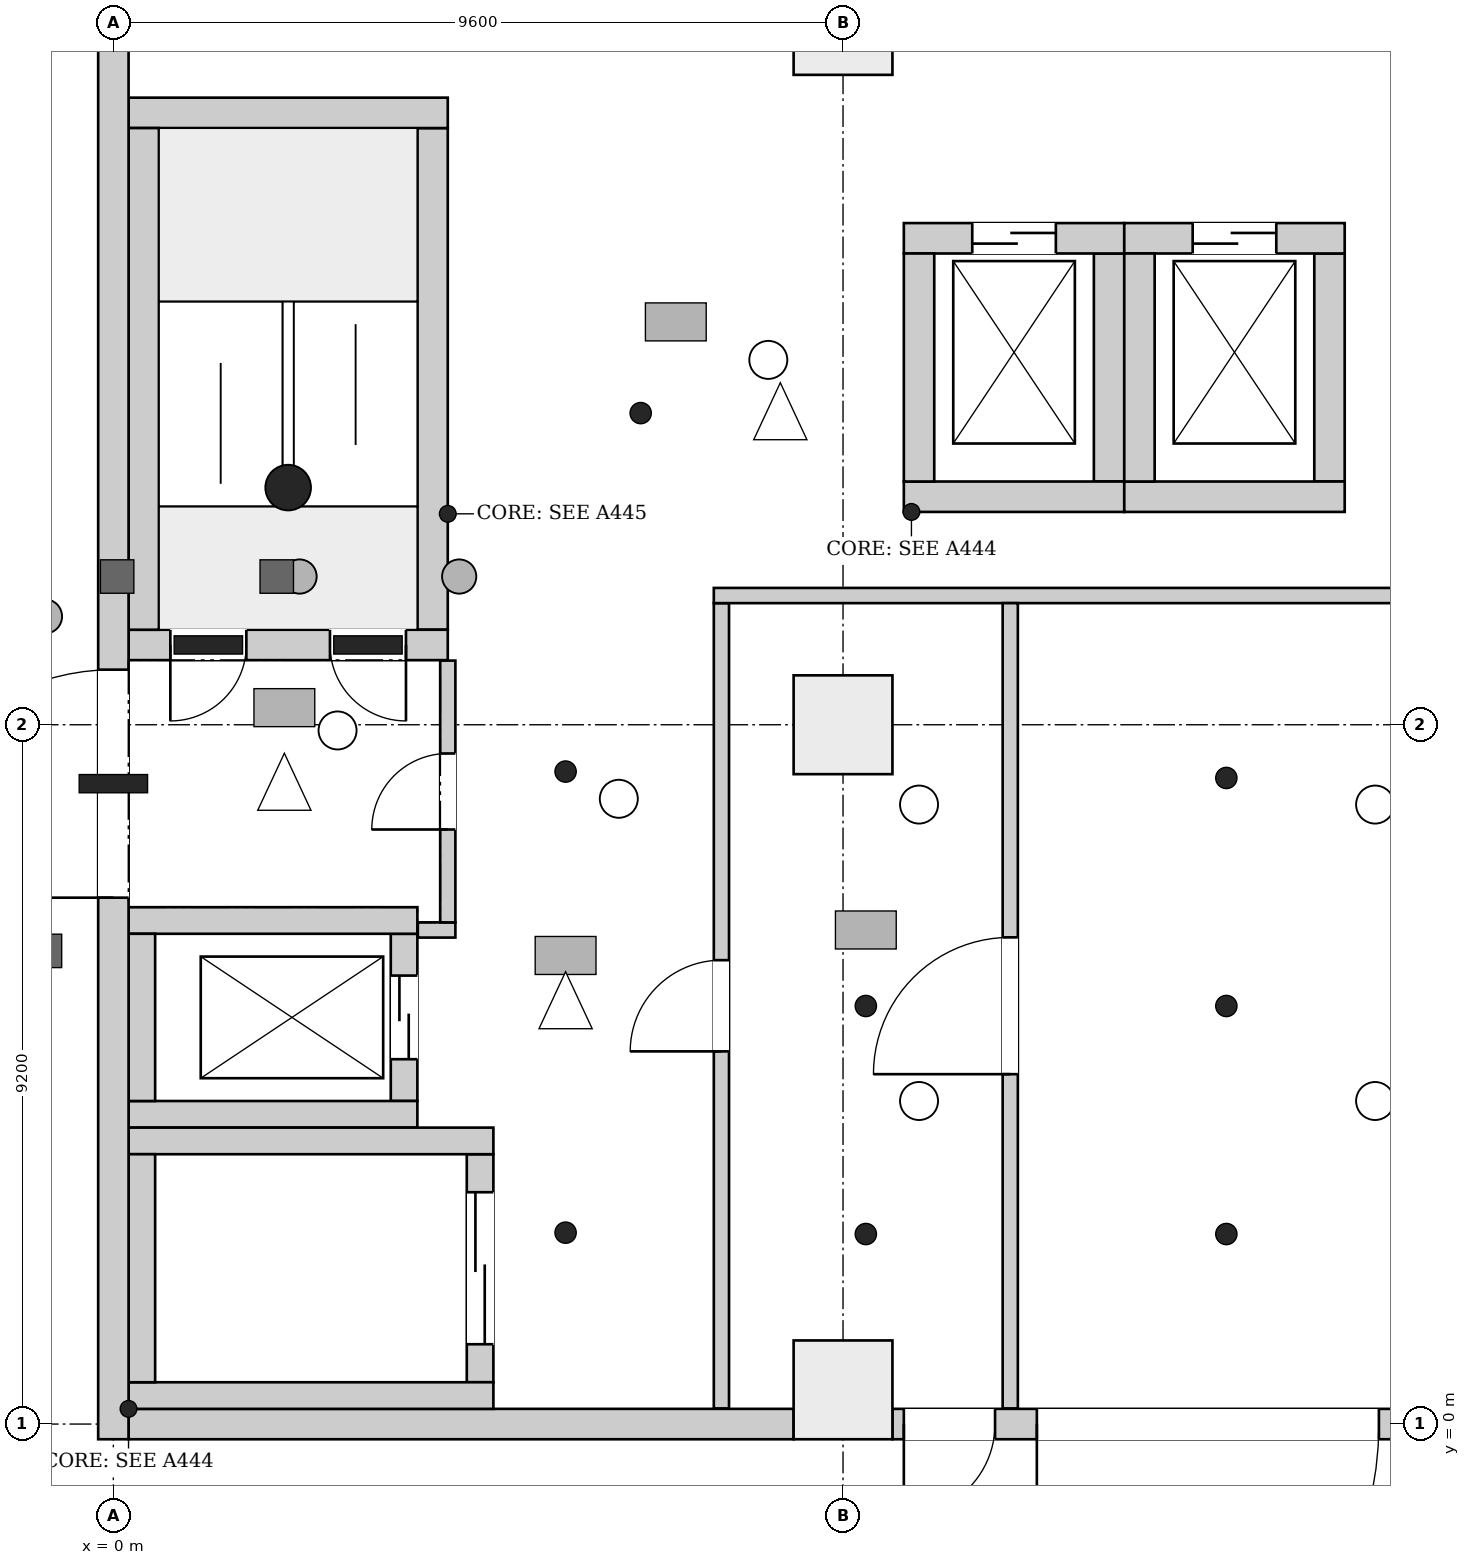
"""IFC4 building model, lengths in metres.
Left out: names, types, materials, properties, quantities, classifications, styles, units other than length and angle.
Written with IfcOpenShell. Run it as: python <this file> out.ifc"""

import sys

from ifc_helpers import new_model, si_unit, direction, frame, frame_2d, origin, origin_2d, place, context, subcontext, project, spatial, rectangle, extrude, element, fill, save


model = new_model("IFC4")
c1 = context("Model", 3, precision=1e-05, world=origin(), true_north=direction((0.0, 1.0)))
c2 = subcontext(c1, "Body", "Model", "MODEL_VIEW")
j1 = project(units=[si_unit("LENGTHUNIT", "METRE"), si_unit("PLANEANGLEUNIT", "RADIAN")], contexts=[c1])
p1 = place(None, origin())
s1 = spatial("IfcSite", under=j1, at=p1, CompositionType="ELEMENT")
p2 = place(p1, origin())
s2 = spatial("IfcBuilding", under=s1, at=p2, CompositionType="ELEMENT")
p3 = place(p2, origin())
s3 = spatial("IfcBuildingStorey", under=s2, at=p3, CompositionType="ELEMENT", Elevation=0.0)
p4 = place(p3, frame((0.0, -0.2, 0.0), z_axis=(0.0, 0.0, 1.0), x_axis=(0.0, 1.0, 0.0)))
e1 = element("IfcWall", 1, at=p4, inside=s3, PredefinedType="SHEAR", context=c2, shape_type="SweptSolid", body=[
    extrude(rectangle(XDim=46.88, YDim=0.4, at=frame_2d((23.44, 0.0))), origin(), (0.0, 0.0, 1.0), 6.5),
])
p5 = place(p4, frame((7.125, 0.0, 0.0)))
e2 = element("IfcOpeningElement", 2, at=p5, cuts=e1, PredefinedType="OPENING", context=c2, shape_type="SweptSolid", body=[
    extrude(rectangle(XDim=3.0, YDim=2.4, at=frame_2d((1.5, 1.2))), frame((0.0, 0.21, 0.0), z_axis=(0.0, -1.0, 0.0), x_axis=(1.0, 0.0, 0.0)), (0.0, 0.0, 1.0), 0.42),
])
p6 = place(p4, frame((38.2, 0.0, 0.0)))
e3 = element("IfcOpeningElement", 3, at=p6, cuts=e1, PredefinedType="OPENING", context=c2, shape_type="SweptSolid", body=[
    extrude(rectangle(XDim=3.0, YDim=2.4, at=frame_2d((1.5, 1.2))), frame((0.0, 0.21, 0.0), z_axis=(0.0, -1.0, 0.0), x_axis=(1.0, 0.0, 0.0)), (0.0, 0.0, 1.0), 0.42),
])
p7 = place(p3, frame((0.2, 10.25, 0.0), z_axis=(0.0, 0.0, 1.0), x_axis=(1.0, 0.0, 0.0)))
e4 = element("IfcWall", 4, at=p7, inside=s3, PredefinedType="SHEAR", context=c2, shape_type="SweptSolid", body=[
    extrude(rectangle(XDim=4.2, YDim=0.4, at=frame_2d((2.1, 0.0))), origin(), (0.0, 0.0, 1.0), 6.5),
])
p8 = place(p7, frame((0.55, 0.0, 0.0)))
e5 = element("IfcOpeningElement", 5, at=p8, cuts=e4, PredefinedType="OPENING", context=c2, shape_type="SweptSolid", body=[
    extrude(rectangle(XDim=1.0, YDim=2.1, at=frame_2d((0.5, 1.05))), frame((0.0, 0.21, 0.0), z_axis=(0.0, -1.0, 0.0), x_axis=(1.0, 0.0, 0.0)), (0.0, 0.0, 1.0), 0.42),
])
p9 = place(p7, frame((2.65, 0.0, 0.0)))
e6 = element("IfcOpeningElement", 6, at=p9, cuts=e4, PredefinedType="OPENING", context=c2, shape_type="SweptSolid", body=[
    extrude(rectangle(XDim=1.0, YDim=2.1, at=frame_2d((0.5, 1.05))), frame((0.0, 0.21, 0.0), z_axis=(0.0, -1.0, 0.0), x_axis=(1.0, 0.0, 0.0)), (0.0, 0.0, 1.0), 0.42),
])
p10 = place(p3, frame((0.2, 17.25, 0.0), z_axis=(0.0, 0.0, 1.0), x_axis=(1.0, 0.0, 0.0)))
e7 = element("IfcWall", 7, at=p10, inside=s3, PredefinedType="SHEAR", context=c2, shape_type="SweptSolid", body=[
    extrude(rectangle(XDim=4.2, YDim=0.4, at=frame_2d((2.1, 0.0))), origin(), (0.0, 0.0, 1.0), 6.5),
])
for number, where, z_axis, x_axis in (
    (8, (0.4, 10.45, 0.0), (0.0, 0.0, 1.0), (0.0, 1.0, 0.0)),
    (9, (4.2, 10.45, 0.0), (0.0, 0.0, 1.0), (0.0, 1.0, 0.0)),
):
    element("IfcWall", number, at=place(p3, frame(where, z_axis=z_axis, x_axis=x_axis)), inside=s3, PredefinedType="SHEAR", context=c2, shape_type="SweptSolid", body=[
        extrude(rectangle(XDim=6.6, YDim=0.4, at=frame_2d((3.3, 0.0))), origin(), (0.0, 0.0, 1.0), 6.5),
    ])
for number, where, z_axis, x_axis in (
    (10, (0.2, 0.375, 0.0), (0.0, 0.0, 1.0), (1.0, 0.0, 0.0)),
    (11, (0.2, 3.725, 0.0), (0.0, 0.0, 1.0), (1.0, 0.0, 0.0)),
):
    element("IfcWall", number, at=place(p3, frame(where, z_axis=z_axis, x_axis=x_axis)), inside=s3, PredefinedType="SHEAR", context=c2, shape_type="SweptSolid", body=[
        extrude(rectangle(XDim=4.8, YDim=0.35, at=frame_2d((2.4, 0.0))), origin(), (0.0, 0.0, 1.0), 6.5),
    ])
p11 = place(p3, frame((0.375, 0.55, 0.0), z_axis=(0.0, 0.0, 1.0), x_axis=(0.0, 1.0, 0.0)))
e12 = element("IfcWall", 12, at=p11, inside=s3, PredefinedType="SHEAR", context=c2, shape_type="SweptSolid", body=[
    extrude(rectangle(XDim=3.0, YDim=0.35, at=frame_2d((1.5, 0.0))), origin(), (0.0, 0.0, 1.0), 6.5),
])
p12 = place(p3, frame((4.825, 0.55, 0.0), z_axis=(0.0, 0.0, 1.0), x_axis=(0.0, 1.0, 0.0)))
e13 = element("IfcWall", 13, at=p12, inside=s3, PredefinedType="SHEAR", context=c2, shape_type="SweptSolid", body=[
    extrude(rectangle(XDim=3.0, YDim=0.35, at=frame_2d((1.5, 0.0))), origin(), (0.0, 0.0, 1.0), 6.5),
])
p13 = place(p12, frame((0.5, 0.0, 0.0)))
e14 = element("IfcOpeningElement", 14, at=p13, cuts=e13, PredefinedType="OPENING", context=c2, shape_type="SweptSolid", body=[
    extrude(rectangle(XDim=2.0, YDim=2.4, at=frame_2d((1.0, 1.2))), frame((0.0, 0.185, 0.0), z_axis=(0.0, -1.0, 0.0), x_axis=(1.0, 0.0, 0.0)), (0.0, 0.0, 1.0), 0.37),
])
for number, where, z_axis, x_axis in (
    (15, (0.2, 4.075, 0.0), (0.0, 0.0, 1.0), (1.0, 0.0, 0.0)),
    (16, (0.2, 6.625, 0.0), (0.0, 0.0, 1.0), (1.0, 0.0, 0.0)),
):
    element("IfcWall", number, at=place(p3, frame(where, z_axis=z_axis, x_axis=x_axis)), inside=s3, PredefinedType="SHEAR", context=c2, shape_type="SweptSolid", body=[
        extrude(rectangle(XDim=3.8, YDim=0.35, at=frame_2d((1.9, 0.0))), origin(), (0.0, 0.0, 1.0), 6.5),
    ])
p14 = place(p3, frame((0.375, 4.25, 0.0), z_axis=(0.0, 0.0, 1.0), x_axis=(0.0, 1.0, 0.0)))
e17 = element("IfcWall", 17, at=p14, inside=s3, PredefinedType="SHEAR", context=c2, shape_type="SweptSolid", body=[
    extrude(rectangle(XDim=2.2, YDim=0.35, at=frame_2d((1.1, 0.0))), origin(), (0.0, 0.0, 1.0), 6.5),
])
p15 = place(p3, frame((3.825, 4.25, 0.0), z_axis=(0.0, 0.0, 1.0), x_axis=(0.0, 1.0, 0.0)))
e18 = element("IfcWall", 18, at=p15, inside=s3, PredefinedType="SHEAR", context=c2, shape_type="SweptSolid", body=[
    extrude(rectangle(XDim=2.2, YDim=0.35, at=frame_2d((1.1, 0.0))), origin(), (0.0, 0.0, 1.0), 6.5),
])
p16 = place(p15, frame((0.55, 0.0, 0.0)))
e19 = element("IfcOpeningElement", 19, at=p16, cuts=e18, PredefinedType="OPENING", context=c2, shape_type="SweptSolid", body=[
    extrude(rectangle(XDim=1.1, YDim=2.1, at=frame_2d((0.55, 1.05))), frame((0.0, 0.185, 0.0), z_axis=(0.0, -1.0, 0.0), x_axis=(1.0, 0.0, 0.0)), (0.0, 0.0, 1.0), 0.37),
])
p17 = place(p3, frame((10.4, 12.2, 0.0), z_axis=(0.0, 0.0, 1.0), x_axis=(1.0, 0.0, 0.0)))
e20 = element("IfcWall", 20, at=p17, inside=s3, PredefinedType="SHEAR", context=c2, shape_type="SweptSolid", body=[
    extrude(rectangle(XDim=2.9, YDim=0.4, at=frame_2d((1.45, 0.0))), origin(), (0.0, 0.0, 1.0), 6.5),
])
p18 = place(p3, frame((10.4, 15.6, 0.0), z_axis=(0.0, 0.0, 1.0), x_axis=(1.0, 0.0, 0.0)))
e21 = element("IfcWall", 21, at=p18, inside=s3, PredefinedType="SHEAR", context=c2, shape_type="SweptSolid", body=[
    extrude(rectangle(XDim=2.9, YDim=0.4, at=frame_2d((1.45, 0.0))), origin(), (0.0, 0.0, 1.0), 6.5),
])
p19 = place(p18, frame((0.9, 0.0, 0.0)))
e22 = element("IfcOpeningElement", 22, at=p19, cuts=e21, PredefinedType="OPENING", context=c2, shape_type="SweptSolid", body=[
    extrude(rectangle(XDim=1.1, YDim=2.1, at=frame_2d((0.55, 1.05))), frame((0.0, 0.21, 0.0), z_axis=(0.0, -1.0, 0.0), x_axis=(1.0, 0.0, 0.0)), (0.0, 0.0, 1.0), 0.42),
])
for number, where, z_axis, x_axis in (
    (23, (10.6, 12.4, 0.0), (0.0, 0.0, 1.0), (0.0, 1.0, 0.0)),
    (24, (13.1, 12.4, 0.0), (0.0, 0.0, 1.0), (0.0, 1.0, 0.0)),
):
    element("IfcWall", number, at=place(p3, frame(where, z_axis=z_axis, x_axis=x_axis)), inside=s3, PredefinedType="SHEAR", context=c2, shape_type="SweptSolid", body=[
        extrude(rectangle(XDim=3.0, YDim=0.4, at=frame_2d((1.5, 0.0))), origin(), (0.0, 0.0, 1.0), 6.5),
    ])
p20 = place(p3, frame((13.3, 12.2, 0.0), z_axis=(0.0, 0.0, 1.0), x_axis=(1.0, 0.0, 0.0)))
e25 = element("IfcWall", 25, at=p20, inside=s3, PredefinedType="SHEAR", context=c2, shape_type="SweptSolid", body=[
    extrude(rectangle(XDim=2.9, YDim=0.4, at=frame_2d((1.45, 0.0))), origin(), (0.0, 0.0, 1.0), 6.5),
])
p21 = place(p3, frame((13.3, 15.6, 0.0), z_axis=(0.0, 0.0, 1.0), x_axis=(1.0, 0.0, 0.0)))
e26 = element("IfcWall", 26, at=p21, inside=s3, PredefinedType="SHEAR", context=c2, shape_type="SweptSolid", body=[
    extrude(rectangle(XDim=2.9, YDim=0.4, at=frame_2d((1.45, 0.0))), origin(), (0.0, 0.0, 1.0), 6.5),
])
p22 = place(p21, frame((0.9, 0.0, 0.0)))
e27 = element("IfcOpeningElement", 27, at=p22, cuts=e26, PredefinedType="OPENING", context=c2, shape_type="SweptSolid", body=[
    extrude(rectangle(XDim=1.1, YDim=2.1, at=frame_2d((0.55, 1.05))), frame((0.0, 0.21, 0.0), z_axis=(0.0, -1.0, 0.0), x_axis=(1.0, 0.0, 0.0)), (0.0, 0.0, 1.0), 0.42),
])
for number, where, z_axis, x_axis in (
    (28, (13.5, 12.4, 0.0), (0.0, 0.0, 1.0), (0.0, 1.0, 0.0)),
    (29, (16.0, 12.4, 0.0), (0.0, 0.0, 1.0), (0.0, 1.0, 0.0)),
):
    element("IfcWall", number, at=place(p3, frame(where, z_axis=z_axis, x_axis=x_axis)), inside=s3, PredefinedType="SHEAR", context=c2, shape_type="SweptSolid", body=[
        extrude(rectangle(XDim=3.0, YDim=0.4, at=frame_2d((1.5, 0.0))), origin(), (0.0, 0.0, 1.0), 6.5),
    ])
for number, where, z_axis, x_axis in (
    (30, (9.6, 0.45, 0.0), (0.0, 0.0, 1.0), (1.0, 0.0, 0.0)),
    (31, (9.6, 9.2, 0.0), (0.0, 0.0, 1.0), (1.0, 0.0, 0.0)),
    (32, (9.6, 18.4, 0.0), (0.0, 0.0, 1.0), (1.0, 0.0, 0.0)),
):
    element("IfcColumn", number, at=place(p3, frame(where, z_axis=z_axis, x_axis=x_axis)), inside=s3, PredefinedType="COLUMN", context=c2, shape_type="SweptSolid", body=[
        extrude(rectangle(XDim=1.3, YDim=1.3, at=origin_2d()), origin(), (0.0, 0.0, 1.0), 6.5),
    ])
p23 = place(p3, frame((0.2, 0.0, 0.0), z_axis=(0.0, 0.0, 1.0), x_axis=(1.0, 0.0, 0.0)))
e33 = element("IfcWall", 33, at=p23, inside=s3, PredefinedType="ELEMENTEDWALL", context=c2, shape_type="SweptSolid", body=[
    extrude(rectangle(XDim=8.75, YDim=0.4, at=frame_2d((4.375, 0.0))), origin(), (0.0, 0.0, 1.0), 6.15),
])
p24 = place(p3, frame((10.25, 0.0, 0.0), z_axis=(0.0, 0.0, 1.0), x_axis=(1.0, 0.0, 0.0)))
e34 = element("IfcWall", 34, at=p24, inside=s3, PredefinedType="ELEMENTEDWALL", context=c2, shape_type="SweptSolid", body=[
    extrude(rectangle(XDim=8.3, YDim=0.4, at=frame_2d((4.15, 0.0))), origin(), (0.0, 0.0, 1.0), 6.15),
])
p25 = place(p24, frame((0.15, 0.0, 0.0)))
e35 = element("IfcOpeningElement", 35, at=p25, cuts=e34, PredefinedType="OPENING", context=c2, shape_type="SweptSolid", body=[
    extrude(rectangle(XDim=1.2, YDim=2.4, at=frame_2d((0.6, 1.2))), frame((0.0, 0.21, 0.0), z_axis=(0.0, -1.0, 0.0), x_axis=(1.0, 0.0, 0.0)), (0.0, 0.0, 1.0), 0.42),
])
p26 = place(p24, frame((1.9, 0.0, 0.0)))
e36 = element("IfcOpeningElement", 36, at=p26, cuts=e34, PredefinedType="OPENING", context=c2, shape_type="SweptSolid", body=[
    extrude(rectangle(XDim=4.5, YDim=4.5, at=frame_2d((2.25, 2.25))), frame((0.0, 0.21, 0.0), z_axis=(0.0, -1.0, 0.0), x_axis=(1.0, 0.0, 0.0)), (0.0, 0.0, 1.0), 0.42),
])
p27 = place(p24, frame((6.9, 0.0, 0.0)))
e37 = element("IfcOpeningElement", 37, at=p27, cuts=e34, PredefinedType="OPENING", context=c2, shape_type="SweptSolid", body=[
    extrude(rectangle(XDim=0.9, YDim=2.1, at=frame_2d((0.45, 1.05))), frame((0.0, 0.21, 0.0), z_axis=(0.0, -1.0, 0.0), x_axis=(1.0, 0.0, 0.0)), (0.0, 0.0, 1.0), 0.42),
])
p28 = place(p3, frame((4.006, 6.5, 0.0), z_axis=(0.0, 0.0, 1.0), x_axis=(1.0, 0.0, 0.0)))
e38 = element("IfcWall", 38, at=p28, inside=s3, PredefinedType="PARTITIONING", context=c2, shape_type="SweptSolid", body=[
    extrude(rectangle(XDim=0.494, YDim=0.2, at=frame_2d((0.247, 0.0))), origin(), (0.0, 0.0, 1.0), 6.15),
])
p29 = place(p3, frame((4.4, 6.6, 0.0), z_axis=(0.0, 0.0, 1.0), x_axis=(0.0, 1.0, 0.0)))
e39 = element("IfcWall", 39, at=p29, inside=s3, PredefinedType="PARTITIONING", context=c2, shape_type="SweptSolid", body=[
    extrude(rectangle(XDim=3.444, YDim=0.2, at=frame_2d((1.722, 0.0))), origin(), (0.0, 0.0, 1.0), 6.15),
])
p30 = place(p29, frame((1.222, 0.0, 0.0)))
e40 = element("IfcOpeningElement", 40, at=p30, cuts=e39, PredefinedType="OPENING", context=c2, shape_type="SweptSolid", body=[
    extrude(rectangle(XDim=1.0, YDim=2.1, at=frame_2d((0.5, 1.05))), frame((0.0, 0.11, 0.0), z_axis=(0.0, -1.0, 0.0), x_axis=(1.0, 0.0, 0.0)), (0.0, 0.0, 1.0), 0.22),
])
p31 = place(p3, frame((8.0, 0.206, 0.0), z_axis=(0.0, 0.0, 1.0), x_axis=(0.0, 1.0, 0.0)))
e41 = element("IfcWall", 41, at=p31, inside=s3, PredefinedType="PARTITIONING", context=c2, shape_type="SweptSolid", body=[
    extrude(rectangle(XDim=10.594, YDim=0.2, at=frame_2d((5.297, 0.0))), origin(), (0.0, 0.0, 1.0), 6.15),
])
p32 = place(p31, frame((4.697, 0.0, 0.0)))
e42 = element("IfcOpeningElement", 42, at=p32, cuts=e41, PredefinedType="OPENING", context=c2, shape_type="SweptSolid", body=[
    extrude(rectangle(XDim=1.2, YDim=2.1, at=frame_2d((0.6, 1.05))), frame((0.0, 0.11, 0.0), z_axis=(0.0, -1.0, 0.0), x_axis=(1.0, 0.0, 0.0)), (0.0, 0.0, 1.0), 0.22),
])
p33 = place(p3, frame((7.9, 10.9, 0.0), z_axis=(0.0, 0.0, 1.0), x_axis=(1.0, 0.0, 0.0)))
e43 = element("IfcWall", 43, at=p33, inside=s3, PredefinedType="PARTITIONING", context=c2, shape_type="SweptSolid", body=[
    extrude(rectangle(XDim=49.494, YDim=0.2, at=frame_2d((24.747, 0.0))), origin(), (0.0, 0.0, 1.0), 6.15),
])
p34 = place(p33, frame((41.3, 0.0, 0.0)))
e44 = element("IfcOpeningElement", 44, at=p34, cuts=e43, PredefinedType="OPENING", context=c2, shape_type="SweptSolid", body=[
    extrude(rectangle(XDim=1.2, YDim=2.1, at=frame_2d((0.6, 1.05))), frame((0.0, 0.11, 0.0), z_axis=(0.0, -1.0, 0.0), x_axis=(1.0, 0.0, 0.0)), (0.0, 0.0, 1.0), 0.22),
])
p35 = place(p3, frame((11.8, 0.206, 0.0), z_axis=(0.0, 0.0, 1.0), x_axis=(0.0, 1.0, 0.0)))
e45 = element("IfcWall", 45, at=p35, inside=s3, PredefinedType="PARTITIONING", context=c2, shape_type="SweptSolid", body=[
    extrude(rectangle(XDim=10.594, YDim=0.2, at=frame_2d((5.297, 0.0))), origin(), (0.0, 0.0, 1.0), 6.15),
])
p36 = place(p35, frame((4.397, 0.0, 0.0)))
e46 = element("IfcOpeningElement", 46, at=p36, cuts=e45, PredefinedType="OPENING", context=c2, shape_type="SweptSolid", body=[
    extrude(rectangle(XDim=1.8, YDim=2.1, at=frame_2d((0.9, 1.05))), frame((0.0, 0.11, 0.0), z_axis=(0.0, -1.0, 0.0), x_axis=(1.0, 0.0, 0.0)), (0.0, 0.0, 1.0), 0.22),
])
p37 = place(p25, frame((1.2, 0.0, 0.0), z_axis=(0.0, 0.0, 1.0), x_axis=(-1.0, 0.0, 0.0)))
e47 = element("IfcDoor", 47, at=p37, inside=s3, OperationType="SINGLE_SWING_RIGHT", PredefinedType="DOOR", context=c2, shape_type="SweptSolid", body=[
    extrude(rectangle(XDim=1.2, YDim=2.4, at=frame_2d((0.6, 1.2))), frame((0.0, 0.025, 0.0), z_axis=(0.0, -1.0, 0.0), x_axis=(1.0, 0.0, 0.0)), (0.0, 0.0, 1.0), 0.05),
])
fill(e35, e47)
p38 = place(p26, frame((4.5, 0.0, 0.0), z_axis=(0.0, 0.0, 1.0), x_axis=(-1.0, 0.0, 0.0)))
e48 = element("IfcDoor", 48, at=p38, inside=s3, OperationType="ROLLINGUP", PredefinedType="GATE", context=c2, shape_type="SweptSolid", body=[
    extrude(rectangle(XDim=4.5, YDim=4.5, at=frame_2d((2.25, 2.25))), frame((0.0, 0.025, 0.0), z_axis=(0.0, -1.0, 0.0), x_axis=(1.0, 0.0, 0.0)), (0.0, 0.0, 1.0), 0.05),
])
fill(e36, e48)
p39 = place(p5, origin())
e49 = element("IfcDoor", 49, at=p39, inside=s3, OperationType="DOUBLE_DOOR_SINGLE_SWING", PredefinedType="DOOR", context=c2, shape_type="SweptSolid", body=[
    extrude(rectangle(XDim=3.0, YDim=2.4, at=frame_2d((1.5, 1.2))), frame((0.0, 0.025, 0.0), z_axis=(0.0, -1.0, 0.0), x_axis=(1.0, 0.0, 0.0)), (0.0, 0.0, 1.0), 0.05),
])
fill(e2, e49)
p40 = place(p8, origin())
e50 = element("IfcDoor", 50, at=p40, inside=s3, OperationType="SINGLE_SWING_LEFT", PredefinedType="DOOR", context=c2, shape_type="SweptSolid", body=[
    extrude(rectangle(XDim=1.0, YDim=2.1, at=frame_2d((0.5, 1.05))), frame((0.0, 0.025, 0.0), z_axis=(0.0, -1.0, 0.0), x_axis=(1.0, 0.0, 0.0)), (0.0, 0.0, 1.0), 0.05),
])
fill(e5, e50)
p41 = place(p9, origin())
e51 = element("IfcDoor", 51, at=p41, inside=s3, OperationType="SINGLE_SWING_RIGHT", PredefinedType="DOOR", context=c2, shape_type="SweptSolid", body=[
    extrude(rectangle(XDim=1.0, YDim=2.1, at=frame_2d((0.5, 1.05))), frame((0.0, 0.025, 0.0), z_axis=(0.0, -1.0, 0.0), x_axis=(1.0, 0.0, 0.0)), (0.0, 0.0, 1.0), 0.05),
])
fill(e6, e51)
p42 = place(p13, origin())
e52 = element("IfcDoor", 52, at=p42, inside=s3, OperationType="DOUBLE_DOOR_SLIDING", PredefinedType="DOOR", context=c2, shape_type="SweptSolid", body=[
    extrude(rectangle(XDim=2.0, YDim=2.4, at=frame_2d((1.0, 1.2))), frame((0.0, 0.025, 0.0), z_axis=(0.0, -1.0, 0.0), x_axis=(1.0, 0.0, 0.0)), (0.0, 0.0, 1.0), 0.05),
])
fill(e14, e52)
p43 = place(p16, origin())
e53 = element("IfcDoor", 53, at=p43, inside=s3, OperationType="DOUBLE_DOOR_SLIDING", PredefinedType="DOOR", context=c2, shape_type="SweptSolid", body=[
    extrude(rectangle(XDim=1.1, YDim=2.1, at=frame_2d((0.55, 1.05))), frame((0.0, 0.025, 0.0), z_axis=(0.0, -1.0, 0.0), x_axis=(1.0, 0.0, 0.0)), (0.0, 0.0, 1.0), 0.05),
])
fill(e19, e53)
p44 = place(p19, origin())
e54 = element("IfcDoor", 54, at=p44, inside=s3, OperationType="DOUBLE_DOOR_SLIDING", PredefinedType="DOOR", context=c2, shape_type="SweptSolid", body=[
    extrude(rectangle(XDim=1.1, YDim=2.1, at=frame_2d((0.55, 1.05))), frame((0.0, 0.025, 0.0), z_axis=(0.0, -1.0, 0.0), x_axis=(1.0, 0.0, 0.0)), (0.0, 0.0, 1.0), 0.05),
])
fill(e22, e54)
p45 = place(p22, origin())
e55 = element("IfcDoor", 55, at=p45, inside=s3, OperationType="DOUBLE_DOOR_SLIDING", PredefinedType="DOOR", context=c2, shape_type="SweptSolid", body=[
    extrude(rectangle(XDim=1.1, YDim=2.1, at=frame_2d((0.55, 1.05))), frame((0.0, 0.025, 0.0), z_axis=(0.0, -1.0, 0.0), x_axis=(1.0, 0.0, 0.0)), (0.0, 0.0, 1.0), 0.05),
])
fill(e27, e55)
p46 = place(p32, origin())
e56 = element("IfcDoor", 56, at=p46, inside=s3, OperationType="SINGLE_SWING_LEFT", PredefinedType="DOOR", context=c2, shape_type="SweptSolid", body=[
    extrude(rectangle(XDim=1.2, YDim=2.1, at=frame_2d((0.6, 1.05))), frame((0.0, 0.025, 0.0), z_axis=(0.0, -1.0, 0.0), x_axis=(1.0, 0.0, 0.0)), (0.0, 0.0, 1.0), 0.05),
])
fill(e42, e56)
p47 = place(p36, origin())
e57 = element("IfcDoor", 57, at=p47, inside=s3, OperationType="DOUBLE_DOOR_SINGLE_SWING", PredefinedType="DOOR", context=c2, shape_type="SweptSolid", body=[
    extrude(rectangle(XDim=1.8, YDim=2.1, at=frame_2d((0.9, 1.05))), frame((0.0, 0.025, 0.0), z_axis=(0.0, -1.0, 0.0), x_axis=(1.0, 0.0, 0.0)), (0.0, 0.0, 1.0), 0.05),
])
fill(e46, e57)
p48 = place(p30, origin())
e58 = element("IfcDoor", 58, at=p48, inside=s3, OperationType="SINGLE_SWING_LEFT", PredefinedType="DOOR", context=c2, shape_type="SweptSolid", body=[
    extrude(rectangle(XDim=1.0, YDim=2.1, at=frame_2d((0.5, 1.05))), frame((0.0, 0.025, 0.0), z_axis=(0.0, -1.0, 0.0), x_axis=(1.0, 0.0, 0.0)), (0.0, 0.0, 1.0), 0.05),
])
fill(e40, e58)
save(model, sys.argv[1])
